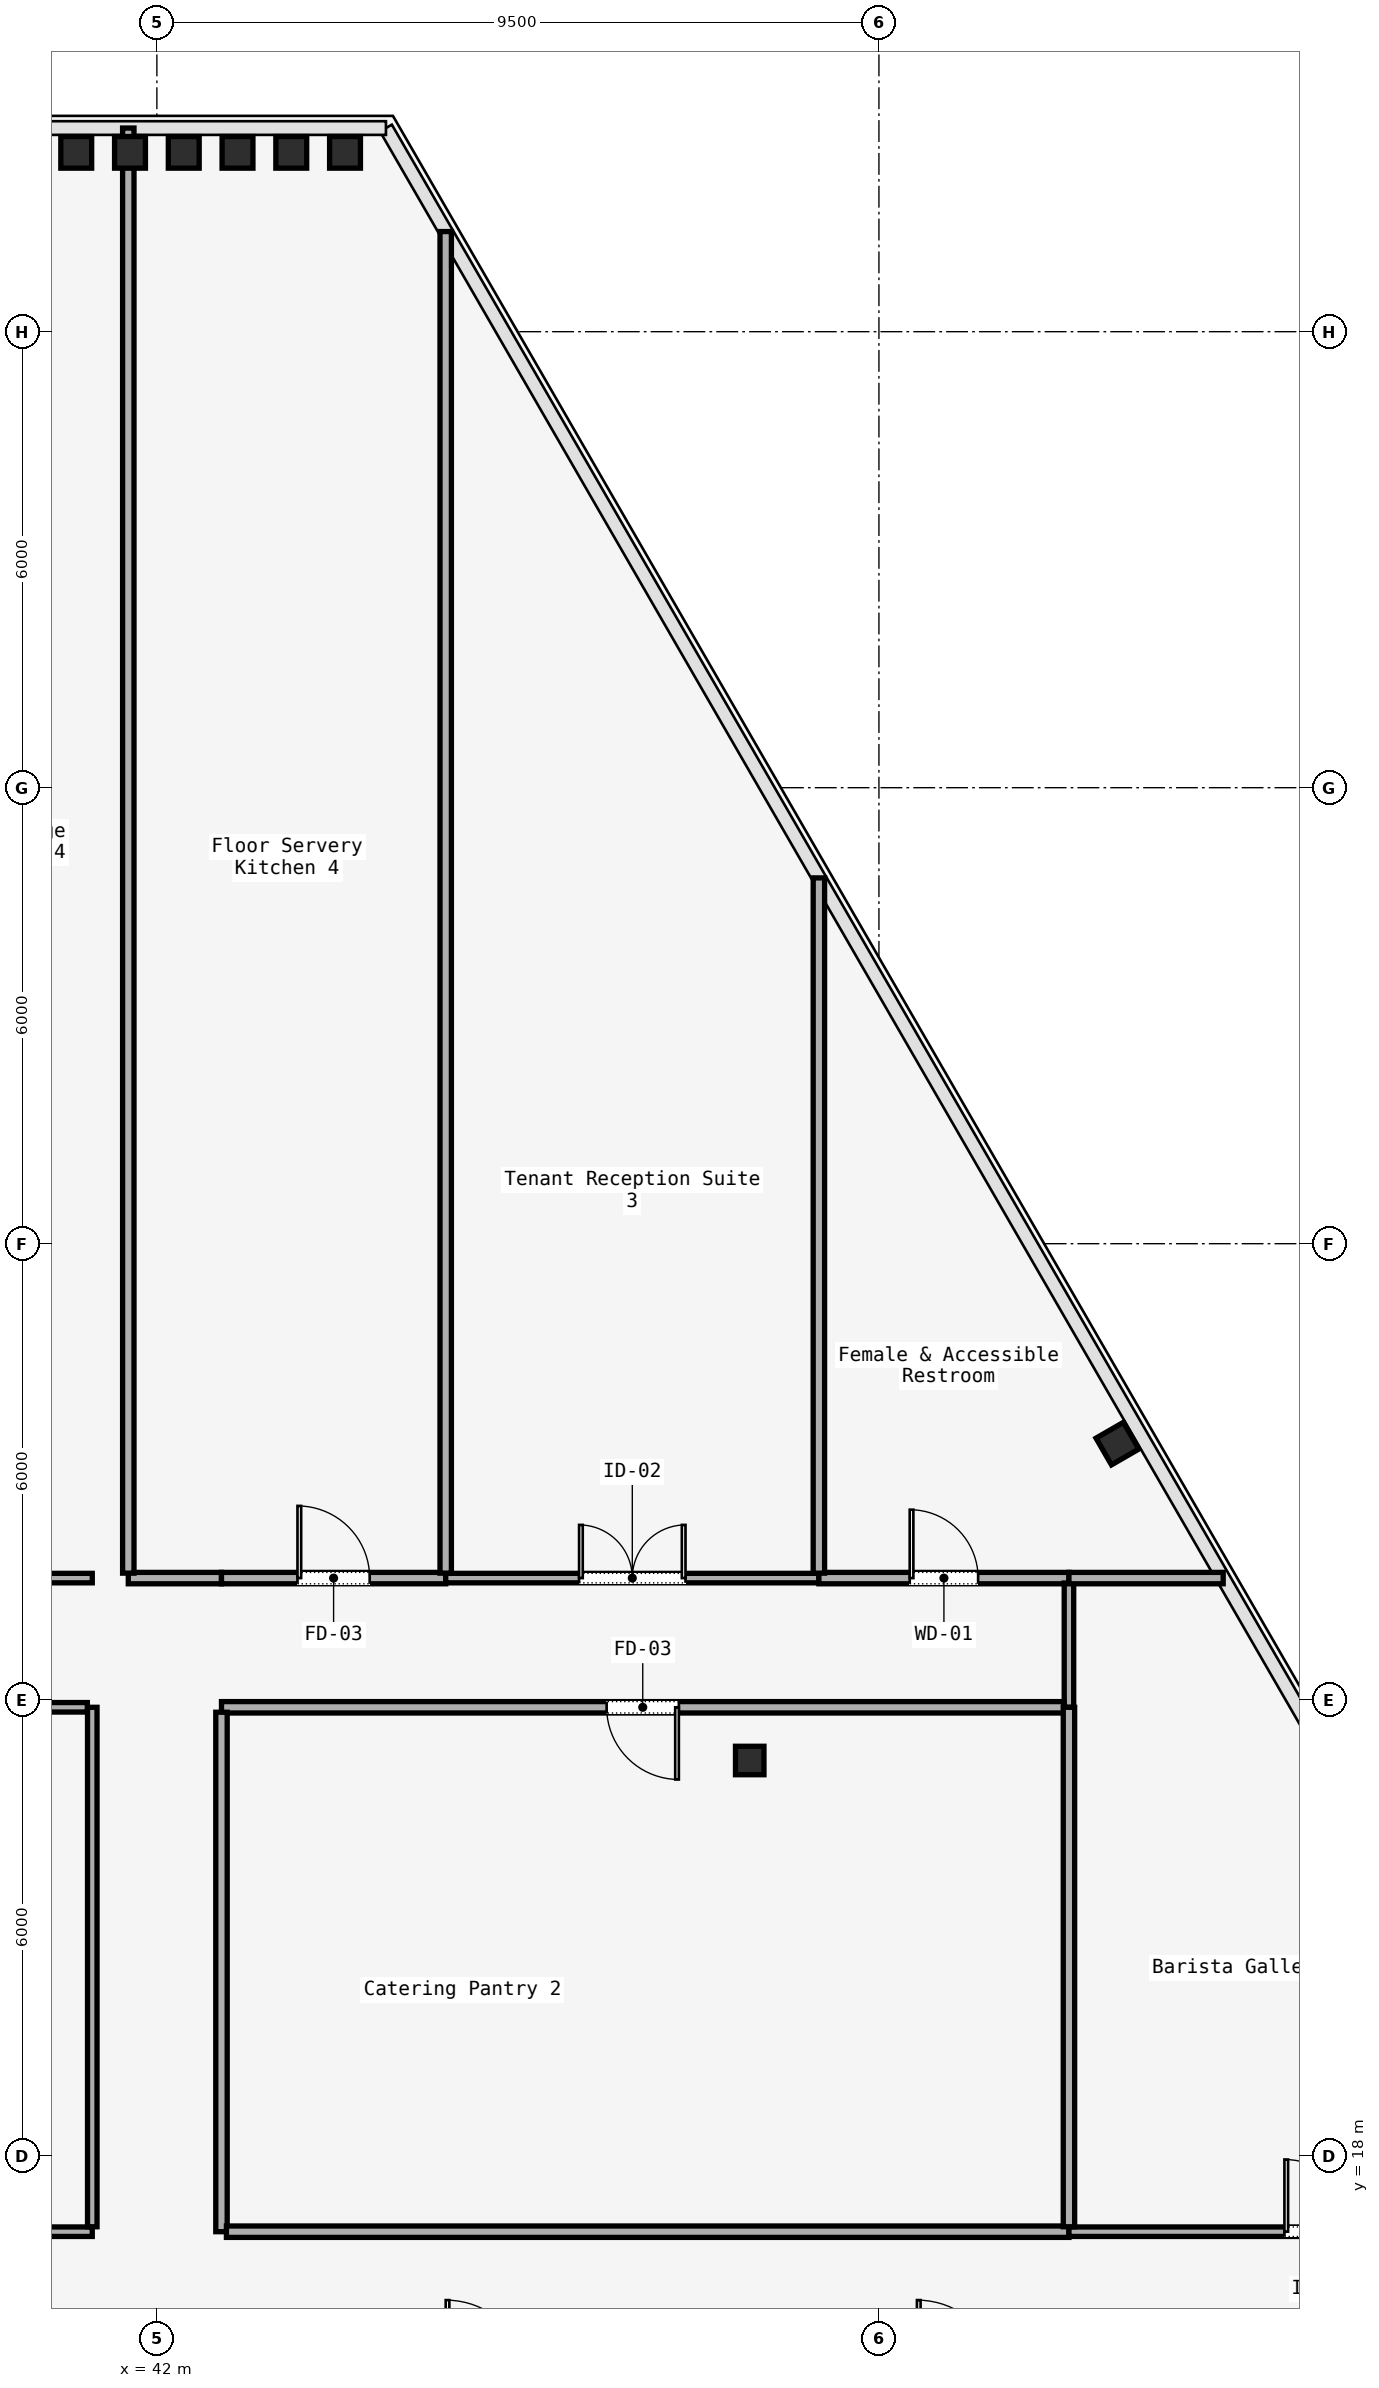
"""IFC4 building model, lengths in metres.
Left out: names, types, materials, properties, quantities, classifications, styles, units other than length and angle.
Written with IfcOpenShell. Run it as: python <this file> out.ifc"""

import sys

from ifc_helpers import new_model, si_unit, direction, frame, frame_2d, origin, origin_2d, place, context, subcontext, project, spatial, rectangle, i_section, extrude, element, fill, save


model = new_model("IFC4")
c1 = context("Model", 3, precision=1e-05, world=origin(), true_north=direction((0.0, 1.0)))
c2 = subcontext(c1, "Body", "Model", "MODEL_VIEW")
j1 = project(units=[si_unit("LENGTHUNIT", "METRE"), si_unit("PLANEANGLEUNIT", "RADIAN")], contexts=[c1])
p1 = place(None, origin())
s1 = spatial("IfcSite", under=j1, at=p1, CompositionType="ELEMENT")
p2 = place(p1, origin())
s2 = spatial("IfcBuilding", under=s1, at=p2, CompositionType="ELEMENT")
p3 = place(p2, frame((0.0, 0.0, 256.0)))
s3 = spatial("IfcBuildingStorey", under=s2, at=p3, CompositionType="ELEMENT", Elevation=256.0)
p4 = place(p3, frame((49.8, 23.2, 0.0), z_axis=(0.0, 0.0, 1.0), x_axis=(1.0, 0.0, 0.0)))
e1 = element("IfcColumn", 1, at=p4, inside=s3, PredefinedType="COLUMN", context=c2, shape_type="SweptSolid", body=[
    extrude(i_section(OverallWidth=0.375, OverallDepth=0.375, WebThickness=0.017, FlangeThickness=0.027, FilletRadius=0.015, at=origin_2d()), origin(), (0.0, 0.0, 1.0), 3.58),
])
for number, where, z_axis, x_axis in (
    (2, (54.638, 27.37, 0.0), (0.0, 0.0, 1.0), (-0.5, 0.866, 0.0)),
    (3, (44.475, 44.36, 0.0), (0.0, 0.0, 1.0), (1.0, 0.0, 0.0)),
    (4, (43.768, 44.36, 0.0), (0.0, 0.0, 1.0), (1.0, 0.0, 0.0)),
    (5, (43.061, 44.36, 0.0), (0.0, 0.0, 1.0), (1.0, 0.0, 0.0)),
    (6, (42.354, 44.36, 0.0), (0.0, 0.0, 1.0), (1.0, 0.0, 0.0)),
    (7, (41.646, 44.36, 0.0), (0.0, 0.0, 1.0), (1.0, 0.0, 0.0)),
    (8, (40.939, 44.36, 0.0), (0.0, 0.0, 1.0), (1.0, 0.0, 0.0)),
):
    element("IfcColumn", number, at=place(p3, frame(where, z_axis=z_axis, x_axis=x_axis)), inside=s3, PredefinedType="COLUMN", context=c2, shape_type="SweptSolid", body=[
        extrude(i_section(OverallWidth=0.406, OverallDepth=0.416, WebThickness=0.03, FlangeThickness=0.037, FilletRadius=0.015, at=origin_2d()), origin(), (0.0, 0.0, 1.0), 3.58),
    ])
p5 = place(p3, frame((29.6, 17.0, 0.0), z_axis=(0.0, 0.0, 1.0), x_axis=(1.0, 0.0, 0.0)))
e9 = element("IfcWall", 9, at=p5, inside=s3, PredefinedType="PARTITIONING", context=c2, shape_type="SweptSolid", body=[
    extrude(rectangle(XDim=11.55, YDim=0.125, at=frame_2d((5.775, 0.0))), origin(), (0.0, 0.0, 1.0), 3.01),
])
p6 = place(p5, frame((5.3, 0.0, 0.0)))
e10 = element("IfcOpeningElement", 10, at=p6, cuts=e9, PredefinedType="OPENING", context=c2, shape_type="SweptSolid", body=[
    extrude(rectangle(XDim=0.95, YDim=2.2, at=frame_2d((0.475, 1.1))), frame((0.0, 0.062, 0.0), z_axis=(0.0, -1.0, 0.0), x_axis=(1.0, 0.0, 0.0)), (0.0, 0.0, 1.0), 0.125),
])
p7 = place(p3, frame((41.15, 17.065, 0.0), z_axis=(0.0, 0.0, 1.0), x_axis=(0.0, 1.0, 0.0)))
e11 = element("IfcWall", 11, at=p7, inside=s3, PredefinedType="PARTITIONING", context=c2, shape_type="SweptSolid", body=[
    extrude(rectangle(XDim=6.835, YDim=0.125, at=frame_2d((3.417, 0.0))), origin(), (0.0, 0.0, 1.0), 3.01),
])
p8 = place(p3, frame((41.085, 23.9, 0.0), z_axis=(0.0, 0.0, 1.0), x_axis=(-1.0, 0.0, 0.0)))
e12 = element("IfcWall", 12, at=p8, inside=s3, PredefinedType="PARTITIONING", context=c2, shape_type="SweptSolid", body=[
    extrude(rectangle(XDim=11.485, YDim=0.125, at=frame_2d((5.742, 0.0))), origin(), (0.0, 0.0, 1.0), 3.01),
])
p9 = place(p3, frame((38.6, 25.6, 0.0), z_axis=(0.0, 0.0, 1.0), x_axis=(1.0, 0.0, 0.0)))
e13 = element("IfcWall", 13, at=p9, inside=s3, PredefinedType="PARTITIONING", context=c2, shape_type="SweptSolid", body=[
    extrude(rectangle(XDim=2.55, YDim=0.125, at=frame_2d((1.275, 0.0))), origin(), (0.0, 0.0, 1.0), 3.01),
])
p10 = place(p9, frame((0.8, 0.0, 0.0)))
e14 = element("IfcOpeningElement", 14, at=p10, cuts=e13, PredefinedType="OPENING", context=c2, shape_type="SweptSolid", body=[
    extrude(rectangle(XDim=0.95, YDim=2.2, at=frame_2d((0.475, 1.1))), frame((0.0, 0.062, 0.0), z_axis=(0.0, -1.0, 0.0), x_axis=(1.0, 0.0, 0.0)), (0.0, 0.0, 1.0), 0.125),
])
p11 = place(p3, frame((41.624, 25.6, 0.0), z_axis=(0.0, 0.0, 1.0), x_axis=(1.0, 0.0, 0.0)))
e15 = element("IfcWall", 15, at=p11, inside=s3, PredefinedType="PARTITIONING", context=c2, shape_type="SweptSolid", body=[
    extrude(rectangle(XDim=1.226, YDim=0.15, at=frame_2d((0.613, 0.0))), origin(), (0.0, 0.0, 1.0), 3.01),
])
p12 = place(p3, frame((42.85, 25.6, 0.0), z_axis=(0.0, 0.0, 1.0), x_axis=(1.0, 0.0, 0.0)))
e16 = element("IfcWall", 16, at=p12, inside=s3, PredefinedType="PARTITIONING", context=c2, shape_type="SweptSolid", body=[
    extrude(rectangle(XDim=2.95, YDim=0.15, at=frame_2d((1.475, 0.0))), origin(), (0.0, 0.0, 1.0), 3.01),
])
p13 = place(p12, frame((1.0, 0.0, 0.0)))
e17 = element("IfcOpeningElement", 17, at=p13, cuts=e16, PredefinedType="OPENING", context=c2, shape_type="SweptSolid", body=[
    extrude(rectangle(XDim=0.95, YDim=2.2, at=frame_2d((0.475, 1.1))), frame((0.0, 0.075, 0.0), z_axis=(0.0, -1.0, 0.0), x_axis=(1.0, 0.0, 0.0)), (0.0, 0.0, 1.0), 0.15),
])
p14 = place(p3, frame((45.8, 25.6, 0.0), z_axis=(0.0, 0.0, 1.0), x_axis=(1.0, 0.0, 0.0)))
e18 = element("IfcWall", 18, at=p14, inside=s3, PredefinedType="PARTITIONING", context=c2, shape_type="SweptSolid", body=[
    extrude(rectangle(XDim=4.91, YDim=0.125, at=frame_2d((2.455, 0.0))), origin(), (0.0, 0.0, 1.0), 3.01),
])
p15 = place(p14, frame((1.755, 0.0, 0.0)))
e19 = element("IfcOpeningElement", 19, at=p15, cuts=e18, PredefinedType="OPENING", context=c2, shape_type="SweptSolid", body=[
    extrude(rectangle(XDim=1.4, YDim=2.2, at=frame_2d((0.7, 1.1))), frame((0.0, 0.062, 0.0), z_axis=(0.0, -1.0, 0.0), x_axis=(1.0, 0.0, 0.0)), (0.0, 0.0, 1.0), 0.125),
])
p16 = place(p3, frame((50.71, 25.6, 0.0), z_axis=(0.0, 0.0, 1.0), x_axis=(1.0, 0.0, 0.0)))
e20 = element("IfcWall", 20, at=p16, inside=s3, PredefinedType="PARTITIONING", context=c2, shape_type="SweptSolid", body=[
    extrude(rectangle(XDim=3.29, YDim=0.15, at=frame_2d((1.645, 0.0))), origin(), (0.0, 0.0, 1.0), 3.01),
])
p17 = place(p16, frame((1.195, 0.0, 0.0)))
e21 = element("IfcOpeningElement", 21, at=p17, cuts=e20, PredefinedType="OPENING", context=c2, shape_type="SweptSolid", body=[
    extrude(rectangle(XDim=0.9, YDim=2.15, at=frame_2d((0.45, 1.075))), frame((0.0, 0.075, 0.0), z_axis=(0.0, -1.0, 0.0), x_axis=(1.0, 0.0, 0.0)), (0.0, 0.0, 1.0), 0.15),
])
p18 = place(p3, frame((54.0, 25.535, 0.0), z_axis=(0.0, 0.0, 1.0), x_axis=(0.0, -1.0, 0.0)))
e22 = element("IfcWall", 22, at=p18, inside=s3, PredefinedType="PARTITIONING", context=c2, shape_type="SweptSolid", body=[
    extrude(rectangle(XDim=1.635, YDim=0.125, at=frame_2d((0.817, 0.0))), origin(), (0.0, 0.0, 1.0), 3.01),
])
p19 = place(p3, frame((53.935, 23.9, 0.0), z_axis=(0.0, 0.0, 1.0), x_axis=(-1.0, 0.0, 0.0)))
e23 = element("IfcWall", 23, at=p19, inside=s3, PredefinedType="PARTITIONING", context=c2, shape_type="SweptSolid", body=[
    extrude(rectangle(XDim=11.085, YDim=0.15, at=frame_2d((5.542, 0.0))), origin(), (0.0, 0.0, 1.0), 3.01),
])
p20 = place(p19, frame((5.067, 0.0, 0.0)))
e24 = element("IfcOpeningElement", 24, at=p20, cuts=e23, PredefinedType="OPENING", context=c2, shape_type="SweptSolid", body=[
    extrude(rectangle(XDim=0.95, YDim=2.2, at=frame_2d((0.475, 1.1))), frame((0.0, 0.075, 0.0), z_axis=(0.0, -1.0, 0.0), x_axis=(1.0, 0.0, 0.0)), (0.0, 0.0, 1.0), 0.15),
])
p21 = place(p3, frame((42.85, 23.835, 0.0), z_axis=(0.0, 0.0, 1.0), x_axis=(0.0, -1.0, 0.0)))
e25 = element("IfcWall", 25, at=p21, inside=s3, PredefinedType="PARTITIONING", context=c2, shape_type="SweptSolid", body=[
    extrude(rectangle(XDim=6.835, YDim=0.15, at=frame_2d((3.417, 0.0))), origin(), (0.0, 0.0, 1.0), 3.01),
])
p22 = place(p3, frame((42.915, 17.0, 0.0), z_axis=(0.0, 0.0, 1.0), x_axis=(1.0, 0.0, 0.0)))
e26 = element("IfcWall", 26, at=p22, inside=s3, PredefinedType="PARTITIONING", context=c2, shape_type="SweptSolid", body=[
    extrude(rectangle(XDim=11.085, YDim=0.15, at=frame_2d((5.542, 0.0))), origin(), (0.0, 0.0, 1.0), 3.01),
])
p23 = place(p3, frame((54.0, 17.0, 0.0), z_axis=(0.0, 0.0, 1.0), x_axis=(1.0, 0.0, 0.0)))
e27 = element("IfcWall", 27, at=p23, inside=s3, PredefinedType="PARTITIONING", context=c2, shape_type="SweptSolid", body=[
    extrude(rectangle(XDim=6.62, YDim=0.125, at=frame_2d((3.31, 0.0))), origin(), (0.0, 0.0, 1.0), 3.01),
])
p24 = place(p23, frame((2.835, 0.0, 0.0)))
e28 = element("IfcOpeningElement", 28, at=p24, cuts=e27, PredefinedType="OPENING", context=c2, shape_type="SweptSolid", body=[
    extrude(rectangle(XDim=0.95, YDim=2.2, at=frame_2d((0.475, 1.1))), frame((0.0, 0.062, 0.0), z_axis=(0.0, -1.0, 0.0), x_axis=(1.0, 0.0, 0.0)), (0.0, 0.0, 1.0), 0.125),
])
p25 = place(p3, frame((54.0, 23.9, 0.0), z_axis=(0.0, 0.0, 1.0), x_axis=(0.0, -1.0, 0.0)))
e29 = element("IfcWall", 29, at=p25, inside=s3, PredefinedType="PARTITIONING", context=c2, shape_type="SweptSolid", body=[
    extrude(rectangle(XDim=6.835, YDim=0.15, at=frame_2d((3.417, 0.0))), origin(), (0.0, 0.0, 1.0), 3.01),
])
p26 = place(p3, frame((54.0, 25.6, 0.0), z_axis=(0.0, 0.0, 1.0), x_axis=(1.0, 0.0, 0.0)))
e30 = element("IfcWall", 30, at=p26, inside=s3, PredefinedType="PARTITIONING", context=c2, shape_type="SweptSolid", body=[
    extrude(rectangle(XDim=2.029, YDim=0.15, at=frame_2d((1.015, 0.0))), origin(), (0.0, 0.0, 1.0), 3.01),
])
p27 = place(p3, frame((50.71, 25.665, 0.0), z_axis=(0.0, 0.0, 1.0), x_axis=(0.0, 1.0, 0.0)))
e31 = element("IfcWall", 31, at=p27, inside=s3, PredefinedType="PARTITIONING", context=c2, shape_type="SweptSolid", body=[
    extrude(rectangle(XDim=9.148, YDim=0.15, at=frame_2d((4.574, 0.0))), origin(), (0.0, 0.0, 1.0), 3.01),
])
p28 = place(p3, frame((45.8, 25.665, 0.0), z_axis=(0.0, 0.0, 1.0), x_axis=(0.0, 1.0, 0.0)))
e32 = element("IfcWall", 32, at=p28, inside=s3, PredefinedType="PARTITIONING", context=c2, shape_type="SweptSolid", body=[
    extrude(rectangle(XDim=17.653, YDim=0.15, at=frame_2d((8.826, 0.0))), origin(), (0.0, 0.0, 1.0), 3.01),
])
p29 = place(p3, frame((41.624, 25.665, 0.0), z_axis=(0.0, 0.0, 1.0), x_axis=(0.0, 1.0, 0.0)))
e33 = element("IfcWall", 33, at=p29, inside=s3, PredefinedType="PARTITIONING", context=c2, shape_type="SweptSolid", body=[
    extrude(rectangle(XDim=19.014, YDim=0.15, at=frame_2d((9.507, 0.0))), origin(), (0.0, 0.0, 1.0), 3.01),
])
p30 = place(p20, origin())
e34 = element("IfcDoor", 34, at=p30, inside=s3, OperationType="SINGLE_SWING_LEFT", PredefinedType="DOOR", context=c2, shape_type="SweptSolid", body=[
    extrude(rectangle(XDim=0.95, YDim=2.2, at=frame_2d((0.475, 1.1))), frame((0.0, 0.025, 0.0), z_axis=(0.0, -1.0, 0.0), x_axis=(1.0, 0.0, 0.0)), (0.0, 0.0, 1.0), 0.05),
])
fill(e24, e34)
p31 = place(p24, origin())
e35 = element("IfcDoor", 35, at=p31, inside=s3, OperationType="SINGLE_SWING_RIGHT", PredefinedType="DOOR", context=c2, shape_type="SweptSolid", body=[
    extrude(rectangle(XDim=0.95, YDim=2.2, at=frame_2d((0.475, 1.1))), frame((0.0, 0.025, 0.0), z_axis=(0.0, -1.0, 0.0), x_axis=(1.0, 0.0, 0.0)), (0.0, 0.0, 1.0), 0.05),
])
fill(e28, e35)
p32 = place(p17, origin())
e36 = element("IfcDoor", 36, at=p32, inside=s3, OperationType="SINGLE_SWING_RIGHT", PredefinedType="DOOR", context=c2, shape_type="SweptSolid", body=[
    extrude(rectangle(XDim=0.9, YDim=2.15, at=frame_2d((0.45, 1.075))), frame((0.0, 0.025, 0.0), z_axis=(0.0, -1.0, 0.0), x_axis=(1.0, 0.0, 0.0)), (0.0, 0.0, 1.0), 0.05),
])
fill(e21, e36)
p33 = place(p15, origin())
e37 = element("IfcDoor", 37, at=p33, inside=s3, OperationType="SINGLE_SWING_RIGHT", PredefinedType="DOOR", context=c2, shape_type="SweptSolid", body=[
    extrude(rectangle(XDim=1.4, YDim=2.2, at=frame_2d((0.7, 1.1))), frame((0.0, 0.025, 0.0), z_axis=(0.0, -1.0, 0.0), x_axis=(1.0, 0.0, 0.0)), (0.0, 0.0, 1.0), 0.05),
])
fill(e19, e37)
p34 = place(p13, origin())
e38 = element("IfcDoor", 38, at=p34, inside=s3, OperationType="SINGLE_SWING_LEFT", PredefinedType="DOOR", context=c2, shape_type="SweptSolid", body=[
    extrude(rectangle(XDim=0.95, YDim=2.2, at=frame_2d((0.475, 1.1))), frame((0.0, 0.025, 0.0), z_axis=(0.0, -1.0, 0.0), x_axis=(1.0, 0.0, 0.0)), (0.0, 0.0, 1.0), 0.05),
])
fill(e17, e38)
save(model, sys.argv[1])
